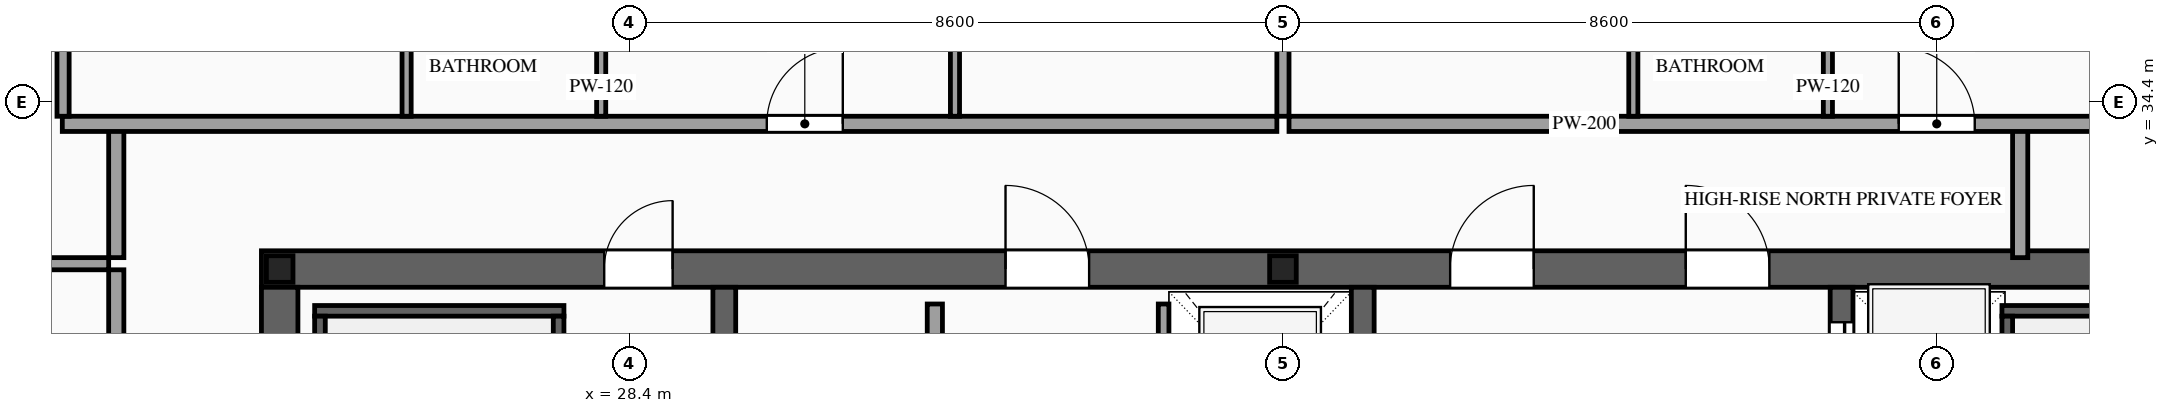
"""IFC4 building model, lengths in metres.
Left out: names, types, materials, properties, quantities, classifications, styles, units other than length and angle.
Written with IfcOpenShell. Run it as: python <this file> out.ifc"""

import sys

from ifc_helpers import new_model, si_unit, direction, frame, frame_2d, origin, origin_2d, place, context, subcontext, project, spatial, rectangle, i_section, extrude, source, transform, mapped, element, fill, save


model = new_model("IFC4")
c1 = context("Model", 3, precision=1e-05, world=origin(), true_north=direction((0.0, 1.0)))
c2 = subcontext(c1, "Body", "Model", "MODEL_VIEW")
j1 = project(units=[si_unit("LENGTHUNIT", "METRE"), si_unit("PLANEANGLEUNIT", "RADIAN")], contexts=[c1])
p1 = place(None, origin())
s1 = spatial("IfcSite", under=j1, at=p1, CompositionType="ELEMENT")
p2 = place(p1, origin())
s2 = spatial("IfcBuilding", under=s1, at=p2, CompositionType="ELEMENT")
p3 = place(p2, frame((0.0, 0.0, 299.6)))
s3 = spatial("IfcBuildingStorey", under=s2, at=p3, CompositionType="ELEMENT", Elevation=299.6)
p4 = place(p3, frame((23.56, 32.2, 0.0), z_axis=(0.0, 0.0, 1.0), x_axis=(1.0, 0.0, 0.0)))
e1 = element("IfcWall", 1, at=p4, inside=s3, PredefinedType="SHEAR", context=c2, shape_type="SweptSolid", body=[
    extrude(rectangle(XDim=26.88, YDim=0.48, at=frame_2d((13.44, 0.0))), origin(), (0.0, 0.0, 1.0), 3.5),
])
p5 = place(p4, frame((4.51, 0.0, 0.0)))
e2 = element("IfcOpeningElement", 2, at=p5, cuts=e1, PredefinedType="OPENING", context=c2, shape_type="SweptSolid", body=[
    extrude(rectangle(XDim=0.9, YDim=2.15, at=frame_2d((0.45, 1.075))), frame((0.0, 0.255, 0.0), z_axis=(0.0, -1.0, 0.0), x_axis=(1.0, 0.0, 0.0)), (0.0, 0.0, 1.0), 0.51),
])
p6 = place(p4, frame((9.79, 0.0, 0.0)))
e3 = element("IfcOpeningElement", 3, at=p6, cuts=e1, PredefinedType="OPENING", context=c2, shape_type="SweptSolid", body=[
    extrude(rectangle(XDim=1.1, YDim=2.2, at=frame_2d((0.55, 1.1))), frame((0.0, 0.255, 0.0), z_axis=(0.0, -1.0, 0.0), x_axis=(1.0, 0.0, 0.0)), (0.0, 0.0, 1.0), 0.51),
])
p7 = place(p4, frame((15.64, 0.0, 0.0)))
e4 = element("IfcOpeningElement", 4, at=p7, cuts=e1, PredefinedType="OPENING", context=c2, shape_type="SweptSolid", body=[
    extrude(rectangle(XDim=1.1, YDim=2.2, at=frame_2d((0.55, 1.1))), frame((0.0, 0.255, 0.0), z_axis=(0.0, -1.0, 0.0), x_axis=(1.0, 0.0, 0.0)), (0.0, 0.0, 1.0), 0.51),
])
p8 = place(p4, frame((18.74, 0.0, 0.0)))
e5 = element("IfcOpeningElement", 5, at=p8, cuts=e1, PredefinedType="OPENING", context=c2, shape_type="SweptSolid", body=[
    extrude(rectangle(XDim=1.1, YDim=2.2, at=frame_2d((0.55, 1.1))), frame((0.0, 0.255, 0.0), z_axis=(0.0, -1.0, 0.0), x_axis=(1.0, 0.0, 0.0)), (0.0, 0.0, 1.0), 0.51),
])
m1 = source(origin(), c2, "Body", "SweptSolid", [
    extrude(rectangle(XDim=12.32, YDim=0.48, at=frame_2d((6.16, 0.0))), origin(), (0.0, 0.0, 1.0), 3.5),
])
p9 = place(p3, frame((23.8, 19.64, 0.0), z_axis=(0.0, 0.0, 1.0), x_axis=(0.0, 1.0, 0.0)))
e6 = element("IfcWall", 6, at=p9, inside=s3, PredefinedType="SHEAR", context=c2, shape_type="MappedRepresentation", body=[
    mapped(m1, transform((0.0, 0.0, 0.0), scale=1.0)),
])
m2 = source(origin(), c2, "Body", "SweptSolid", [
    extrude(rectangle(XDim=12.32, YDim=0.3, at=frame_2d((6.16, 0.0))), origin(), (0.0, 0.0, 1.0), 3.5),
])
for number, where, z_axis, x_axis in (
    (7, (29.65, 19.64, 0.0), (0.0, 0.0, 1.0), (0.0, 1.0, 0.0)),
    (8, (38.05, 19.64, 0.0), (0.0, 0.0, 1.0), (0.0, 1.0, 0.0)),
):
    element("IfcWall", number, at=place(p3, frame(where, z_axis=z_axis, x_axis=x_axis)), inside=s3, PredefinedType="SOLIDWALL", context=c2, shape_type="MappedRepresentation", body=[
        mapped(m2, transform((0.0, 0.0, 0.0), scale=1.0)),
    ])
p10 = place(p3, frame((44.35, 19.64, 0.0), z_axis=(0.0, 0.0, 1.0), x_axis=(0.0, 1.0, 0.0)))
e9 = element("IfcWall", 9, at=p10, inside=s3, PredefinedType="SOLIDWALL", context=c2, shape_type="SweptSolid", body=[
    extrude(rectangle(XDim=12.32, YDim=0.3, at=frame_2d((6.16, 0.0))), origin(), (0.0, 0.0, 1.0), 3.5),
])
p11 = place(p10, frame((6.56, 0.0, 0.0)))
e10 = element("IfcOpeningElement", 10, at=p11, cuts=e9, PredefinedType="OPENING", context=c2, shape_type="SweptSolid", body=[
    extrude(rectangle(XDim=1.1, YDim=2.2, at=frame_2d((0.55, 1.1))), frame((0.0, 0.165, 0.0), z_axis=(0.0, -1.0, 0.0), x_axis=(1.0, 0.0, 0.0)), (0.0, 0.0, 1.0), 0.33),
])
p12 = place(p10, frame((8.66, 0.0, 0.0)))
e11 = element("IfcOpeningElement", 11, at=p12, cuts=e9, PredefinedType="OPENING", context=c2, shape_type="SweptSolid", body=[
    extrude(rectangle(XDim=1.1, YDim=2.2, at=frame_2d((0.55, 1.1))), frame((0.0, 0.165, 0.0), z_axis=(0.0, -1.0, 0.0), x_axis=(1.0, 0.0, 0.0)), (0.0, 0.0, 1.0), 0.33),
])
p13 = place(p10, frame((10.76, 0.0, 0.0)))
e12 = element("IfcOpeningElement", 12, at=p13, cuts=e9, PredefinedType="OPENING", context=c2, shape_type="SweptSolid", body=[
    extrude(rectangle(XDim=1.1, YDim=2.2, at=frame_2d((0.55, 1.1))), frame((0.0, 0.165, 0.0), z_axis=(0.0, -1.0, 0.0), x_axis=(1.0, 0.0, 0.0)), (0.0, 0.0, 1.0), 0.33),
])
m3 = source(origin(), c2, "Body", "SweptSolid", [
    extrude(i_section(OverallWidth=0.35, OverallDepth=0.35, WebThickness=0.012, FlangeThickness=0.019, at=origin_2d()), origin(), (0.0, 0.0, 1.0), 3.5),
])
for number, where, z_axis, x_axis in (
    (13, (23.8, 32.2, 0.0), (0.0, 0.0, 1.0), (1.0, 0.0, 0.0)),
    (14, (37.0, 32.2, 0.0), (0.0, 0.0, 1.0), (1.0, 0.0, 0.0)),
):
    element("IfcColumn", number, at=place(p3, frame(where, z_axis=z_axis, x_axis=x_axis)), inside=s3, PredefinedType="COLUMN", context=c2, shape_type="MappedRepresentation", body=[
        mapped(m3, transform((0.0, 0.0, 0.0), scale=1.0)),
    ])
p14 = place(p3, frame((35.43, 29.4, 0.0), z_axis=(0.0, 0.0, 1.0), x_axis=(0.0, 1.0, 0.0)))
e15 = element("IfcWall", 15, at=p14, inside=s3, PredefinedType="SOLIDWALL", context=c2, shape_type="SweptSolid", body=[
    extrude(rectangle(XDim=2.34, YDim=0.14, at=frame_2d((1.17, 0.0))), origin(), (0.0, 0.0, 1.0), 3.28),
])
p15 = place(p14, frame((0.62, 0.0, 0.0)))
e16 = element("IfcOpeningElement", 16, at=p15, cuts=e15, PredefinedType="OPENING", context=c2, shape_type="SweptSolid", body=[
    extrude(rectangle(XDim=1.1, YDim=2.2, at=frame_2d((0.55, 1.1))), frame((0.0, 0.085, 0.0), z_axis=(0.0, -1.0, 0.0), x_axis=(1.0, 0.0, 0.0)), (0.0, 0.0, 1.0), 0.17),
])
m4 = source(origin(), c2, "Body", "SweptSolid", [
    extrude(rectangle(XDim=3.28, YDim=0.14, at=frame_2d((1.64, 0.0))), origin(), (0.0, 0.0, 1.0), 3.28),
])
p16 = place(p3, frame((24.26, 31.65, 0.0), z_axis=(0.0, 0.0, 1.0), x_axis=(1.0, 0.0, 0.0)))
e17 = element("IfcWall", 17, at=p16, inside=s3, PredefinedType="SOLIDWALL", context=c2, shape_type="MappedRepresentation", body=[
    mapped(m4, transform((0.0, 0.0, 0.0), scale=1.0)),
])
m5 = source(origin(), c2, "Body", "SweptSolid", [
    extrude(rectangle(XDim=8.94, YDim=0.14, at=frame_2d((4.47, 0.0))), origin(), (0.0, 0.0, 1.0), 3.28),
])
for number, where, z_axis, x_axis in (
    (18, (24.33, 22.64, 0.0), (0.0, 0.0, 1.0), (0.0, 1.0, 0.0)),
    (19, (27.47, 22.64, 0.0), (0.0, 0.0, 1.0), (0.0, 1.0, 0.0)),
):
    element("IfcWall", number, at=place(p3, frame(where, z_axis=z_axis, x_axis=x_axis)), inside=s3, PredefinedType="SOLIDWALL", context=c2, shape_type="MappedRepresentation", body=[
        mapped(m5, transform((0.0, 0.0, 0.0), scale=1.0)),
    ])
p17 = place(p3, frame((46.46, 31.65, 0.0), z_axis=(0.0, 0.0, 1.0), x_axis=(1.0, 0.0, 0.0)))
e20 = element("IfcWall", 20, at=p17, inside=s3, PredefinedType="SOLIDWALL", context=c2, shape_type="MappedRepresentation", body=[
    mapped(m4, transform((0.0, 0.0, 0.0), scale=1.0)),
])
p18 = place(p3, frame((46.53, 22.64, 0.0), z_axis=(0.0, 0.0, 1.0), x_axis=(0.0, 1.0, 0.0)))
e21 = element("IfcWall", 21, at=p18, inside=s3, PredefinedType="SOLIDWALL", context=c2, shape_type="MappedRepresentation", body=[
    mapped(m5, transform((0.0, 0.0, 0.0), scale=1.0)),
])
p19 = place(p3, frame((32.42, 25.92, 0.0), z_axis=(0.0, 0.0, 1.0), x_axis=(0.0, 1.0, 0.0)))
e22 = element("IfcWall", 22, at=p19, inside=s3, PredefinedType="PARTITIONING", context=c2, shape_type="SweptSolid", body=[
    extrude(rectangle(XDim=5.82, YDim=0.2, at=frame_2d((2.91, 0.0))), origin(), (0.0, 0.0, 1.0), 3.28),
])
p20 = place(p19, frame((2.46, 0.0, 0.0)))
e23 = element("IfcOpeningElement", 23, at=p20, cuts=e22, PredefinedType="OPENING", context=c2, shape_type="SweptSolid", body=[
    extrude(rectangle(XDim=0.9, YDim=2.15, at=frame_2d((0.45, 1.075))), frame((0.0, 0.115, 0.0), z_axis=(0.0, -1.0, 0.0), x_axis=(1.0, 0.0, 0.0)), (0.0, 0.0, 1.0), 0.23),
])
m6 = source(origin(), c2, "Body", "SweptSolid", [
    extrude(rectangle(XDim=1.7, YDim=0.2, at=frame_2d((0.85, 0.0))), origin(), (0.0, 0.0, 1.0), 3.28),
])
for number, where, z_axis, x_axis in (
    (24, (21.65, 32.35, 0.0), (0.0, 0.0, 1.0), (0.0, 1.0, 0.0)),
    (25, (46.7, 32.35, 0.0), (0.0, 0.0, 1.0), (0.0, 1.0, 0.0)),
):
    element("IfcWall", number, at=place(p3, frame(where, z_axis=z_axis, x_axis=x_axis)), inside=s3, PredefinedType="PARTITIONING", context=c2, shape_type="MappedRepresentation", body=[
        mapped(m6, transform((0.0, 0.0, 0.0), scale=1.0)),
    ])
p21 = place(p3, frame((20.94, 34.11, 0.0), z_axis=(0.0, 0.0, 1.0), x_axis=(1.0, 0.0, 0.0)))
e26 = element("IfcWall", 26, at=p21, inside=s3, PredefinedType="PARTITIONING", context=c2, shape_type="SweptSolid", body=[
    extrude(rectangle(XDim=15.98, YDim=0.2, at=frame_2d((7.99, 0.0))), origin(), (0.0, 0.0, 1.0), 3.28),
])
p22 = place(p21, frame((9.269, 0.0, 0.0)))
e27 = element("IfcOpeningElement", 27, at=p22, cuts=e26, PredefinedType="OPENING", context=c2, shape_type="SweptSolid", body=[
    extrude(rectangle(XDim=1.0, YDim=2.2, at=frame_2d((0.5, 1.1))), frame((0.0, 0.115, 0.0), z_axis=(0.0, -1.0, 0.0), x_axis=(1.0, 0.0, 0.0)), (0.0, 0.0, 1.0), 0.23),
])
m7 = source(origin(), c2, "Body", "SweptSolid", [
    extrude(rectangle(XDim=10.54, YDim=0.16, at=frame_2d((5.27, 0.0))), origin(), (0.0, 0.0, 1.0), 2.787),
])
p23 = place(p3, frame((37.0, 34.21, 0.0), z_axis=(0.0, 0.0, 1.0), x_axis=(0.0, 1.0, 0.0)))
e28 = element("IfcWall", 28, at=p23, inside=s3, PredefinedType="PARTITIONING", context=c2, shape_type="MappedRepresentation", body=[
    mapped(m7, transform((0.0, 0.0, 0.0), scale=1.0)),
])
m8 = source(origin(), c2, "Body", "SweptSolid", [
    extrude(rectangle(XDim=2.9, YDim=0.12, at=frame_2d((1.45, 0.0))), origin(), (0.0, 0.0, 1.0), 3.28),
])
p24 = place(p3, frame((25.47, 34.21, 0.0), z_axis=(0.0, 0.0, 1.0), x_axis=(0.0, 1.0, 0.0)))
e29 = element("IfcWall", 29, at=p24, inside=s3, PredefinedType="PARTITIONING", context=c2, shape_type="MappedRepresentation", body=[
    mapped(m8, transform((0.0, 0.0, 0.0), scale=1.0)),
])
p25 = place(p3, frame((28.03, 34.21, 0.0), z_axis=(0.0, 0.0, 1.0), x_axis=(0.0, 1.0, 0.0)))
e30 = element("IfcWall", 30, at=p25, inside=s3, PredefinedType="PARTITIONING", context=c2, shape_type="SweptSolid", body=[
    extrude(rectangle(XDim=2.9, YDim=0.12, at=frame_2d((1.45, 0.0))), origin(), (0.0, 0.0, 1.0), 3.28),
])
p26 = place(p25, frame((1.025, 0.0, 0.0)))
e31 = element("IfcOpeningElement", 31, at=p26, cuts=e30, PredefinedType="OPENING", context=c2, shape_type="SweptSolid", body=[
    extrude(rectangle(XDim=0.85, YDim=2.1, at=frame_2d((0.425, 1.05))), frame((0.0, 0.075, 0.0), z_axis=(0.0, -1.0, 0.0), x_axis=(1.0, 0.0, 0.0)), (0.0, 0.0, 1.0), 0.15),
])
p27 = place(p3, frame((32.685, 34.21, 0.0), z_axis=(0.0, 0.0, 1.0), x_axis=(0.0, 1.0, 0.0)))
e32 = element("IfcWall", 32, at=p27, inside=s3, PredefinedType="PARTITIONING", context=c2, shape_type="MappedRepresentation", body=[
    mapped(m8, transform((0.0, 0.0, 0.0), scale=1.0)),
])
p28 = place(p3, frame((37.08, 34.11, 0.0), z_axis=(0.0, 0.0, 1.0), x_axis=(1.0, 0.0, 0.0)))
e33 = element("IfcWall", 33, at=p28, inside=s3, PredefinedType="PARTITIONING", context=c2, shape_type="SweptSolid", body=[
    extrude(rectangle(XDim=15.98, YDim=0.2, at=frame_2d((7.99, 0.0))), origin(), (0.0, 0.0, 1.0), 3.28),
])
p29 = place(p28, frame((8.022, 0.0, 0.0)))
e34 = element("IfcOpeningElement", 34, at=p29, cuts=e33, PredefinedType="OPENING", context=c2, shape_type="SweptSolid", body=[
    extrude(rectangle(XDim=1.0, YDim=2.2, at=frame_2d((0.5, 1.1))), frame((0.0, 0.115, 0.0), z_axis=(0.0, -1.0, 0.0), x_axis=(1.0, 0.0, 0.0)), (0.0, 0.0, 1.0), 0.23),
])
m9 = source(origin(), c2, "Body", "SweptSolid", [
    extrude(rectangle(XDim=10.39, YDim=0.16, at=frame_2d((5.195, 0.0))), origin(), (0.0, 0.0, 1.0), 3.28),
])
p30 = place(p3, frame((20.95, 34.21, 0.0), z_axis=(0.0, 0.0, 1.0), x_axis=(0.0, 1.0, 0.0)))
e35 = element("IfcWall", 35, at=p30, inside=s3, PredefinedType="PARTITIONING", context=c2, shape_type="MappedRepresentation", body=[
    mapped(m9, transform((0.0, 0.0, 0.0), scale=1.0)),
])
p31 = place(p3, frame((41.61, 34.21, 0.0), z_axis=(0.0, 0.0, 1.0), x_axis=(0.0, 1.0, 0.0)))
e36 = element("IfcWall", 36, at=p31, inside=s3, PredefinedType="PARTITIONING", context=c2, shape_type="MappedRepresentation", body=[
    mapped(m8, transform((0.0, 0.0, 0.0), scale=1.0)),
])
p32 = place(p3, frame((44.17, 34.21, 0.0), z_axis=(0.0, 0.0, 1.0), x_axis=(0.0, 1.0, 0.0)))
e37 = element("IfcWall", 37, at=p32, inside=s3, PredefinedType="PARTITIONING", context=c2, shape_type="SweptSolid", body=[
    extrude(rectangle(XDim=2.9, YDim=0.12, at=frame_2d((1.45, 0.0))), origin(), (0.0, 0.0, 1.0), 3.28),
])
p33 = place(p32, frame((1.025, 0.0, 0.0)))
e38 = element("IfcOpeningElement", 38, at=p33, cuts=e37, PredefinedType="OPENING", context=c2, shape_type="SweptSolid", body=[
    extrude(rectangle(XDim=0.85, YDim=2.1, at=frame_2d((0.425, 1.05))), frame((0.0, 0.075, 0.0), z_axis=(0.0, -1.0, 0.0), x_axis=(1.0, 0.0, 0.0)), (0.0, 0.0, 1.0), 0.15),
])
p34 = place(p3, frame((21.65, 19.41, 0.0), z_axis=(0.0, 0.0, 1.0), x_axis=(0.0, 1.0, 0.0)))
e39 = element("IfcWall", 39, at=p34, inside=s3, PredefinedType="PARTITIONING", context=c2, shape_type="SweptSolid", body=[
    extrude(rectangle(XDim=12.78, YDim=0.2, at=frame_2d((6.39, 0.0))), origin(), (0.0, 0.0, 1.0), 3.28),
])
p35 = place(p34, frame((5.89, 0.0, 0.0)))
e40 = element("IfcOpeningElement", 40, at=p35, cuts=e39, PredefinedType="OPENING", context=c2, shape_type="SweptSolid", body=[
    extrude(rectangle(XDim=1.0, YDim=2.2, at=frame_2d((0.5, 1.1))), frame((0.0, 0.115, 0.0), z_axis=(0.0, -1.0, 0.0), x_axis=(1.0, 0.0, 0.0)), (0.0, 0.0, 1.0), 0.23),
])
m10 = source(origin(), c2, "Body", "SweptSolid", [
    extrude(rectangle(XDim=3.5, YDim=0.16, at=frame_2d((1.75, 0.0))), origin(), (0.0, 0.0, 1.0), 2.825),
])
p36 = place(p3, frame((18.05, 32.27, 0.0), z_axis=(0.0, 0.0, 1.0), x_axis=(1.0, 0.0, 0.0)))
e41 = element("IfcWall", 41, at=p36, inside=s3, PredefinedType="PARTITIONING", context=c2, shape_type="MappedRepresentation", body=[
    mapped(m10, transform((0.0, 0.0, 0.0), scale=1.0)),
])
m11 = source(origin(), c2, "Body", "SweptSolid", [
    extrude(rectangle(XDim=1.1, YDim=2.2, at=frame_2d((0.55, 1.1))), frame((0.0, 0.025, 0.0), z_axis=(0.0, -1.0, 0.0), x_axis=(1.0, 0.0, 0.0)), (0.0, 0.0, 1.0), 0.05),
])
p37 = place(p13, origin())
e42 = element("IfcDoor", 42, at=p37, inside=s3, OperationType="SLIDING_TO_LEFT", PredefinedType="DOOR", context=c2, shape_type="MappedRepresentation", body=[
    mapped(m11, transform((0.0, 0.0, 0.0), scale=1.0)),
])
fill(e12, e42)
m12 = source(origin(), c2, "Body", "SweptSolid", [
    extrude(rectangle(XDim=0.9, YDim=2.15, at=frame_2d((0.45, 1.075))), frame((0.0, 0.025, 0.0), z_axis=(0.0, -1.0, 0.0), x_axis=(1.0, 0.0, 0.0)), (0.0, 0.0, 1.0), 0.05),
])
p38 = place(p5, origin())
e43 = element("IfcDoor", 43, at=p38, inside=s3, OperationType="SINGLE_SWING_RIGHT", PredefinedType="DOOR", context=c2, shape_type="MappedRepresentation", body=[
    mapped(m12, transform((0.0, 0.0, 0.0), scale=1.0)),
])
fill(e2, e43)
m13 = source(origin(), c2, "Body", "SweptSolid", [
    extrude(rectangle(XDim=1.1, YDim=2.2, at=frame_2d((0.55, 1.1))), frame((0.0, 0.025, 0.0), z_axis=(0.0, -1.0, 0.0), x_axis=(1.0, 0.0, 0.0)), (0.0, 0.0, 1.0), 0.05),
])
p39 = place(p6, origin())
e44 = element("IfcDoor", 44, at=p39, inside=s3, OperationType="SINGLE_SWING_LEFT", PredefinedType="DOOR", context=c2, shape_type="MappedRepresentation", body=[
    mapped(m13, transform((0.0, 0.0, 0.0), scale=1.0)),
])
fill(e3, e44)
p40 = place(p7, origin())
e45 = element("IfcDoor", 45, at=p40, inside=s3, OperationType="SINGLE_SWING_RIGHT", PredefinedType="DOOR", context=c2, shape_type="MappedRepresentation", body=[
    mapped(m13, transform((0.0, 0.0, 0.0), scale=1.0)),
])
fill(e4, e45)
p41 = place(p8, origin())
e46 = element("IfcDoor", 46, at=p41, inside=s3, OperationType="SINGLE_SWING_LEFT", PredefinedType="DOOR", context=c2, shape_type="MappedRepresentation", body=[
    mapped(m13, transform((0.0, 0.0, 0.0), scale=1.0)),
])
fill(e5, e46)
m14 = source(origin(), c2, "Body", "SweptSolid", [
    extrude(rectangle(XDim=1.0, YDim=2.2, at=frame_2d((0.5, 1.1))), frame((0.0, 0.025, 0.0), z_axis=(0.0, -1.0, 0.0), x_axis=(1.0, 0.0, 0.0)), (0.0, 0.0, 1.0), 0.05),
])
p42 = place(p22, origin())
e47 = element("IfcDoor", 47, at=p42, inside=s3, OperationType="SINGLE_SWING_RIGHT", PredefinedType="DOOR", context=c2, shape_type="MappedRepresentation", body=[
    mapped(m14, transform((0.0, 0.0, 0.0), scale=1.0)),
])
fill(e27, e47)
p43 = place(p29, origin())
e48 = element("IfcDoor", 48, at=p43, inside=s3, OperationType="SINGLE_SWING_LEFT", PredefinedType="DOOR", context=c2, shape_type="MappedRepresentation", body=[
    mapped(m14, transform((0.0, 0.0, 0.0), scale=1.0)),
])
fill(e34, e48)
save(model, sys.argv[1])
